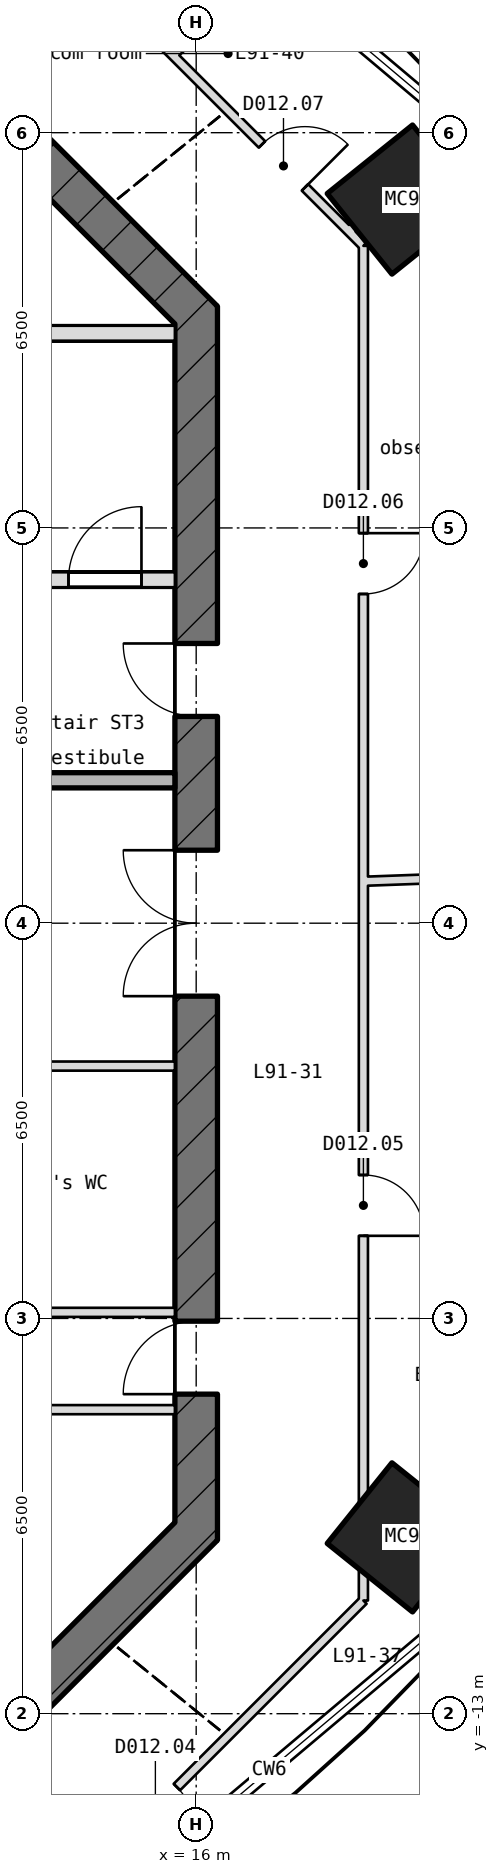
"""IFC4 building model, lengths in metres.
Left out: names, types, materials, properties, quantities, classifications, styles, units other than length and angle.
Written with IfcOpenShell. Run it as: python <this file> out.ifc"""

import sys

from ifc_helpers import new_model, si_unit, direction, frame, frame_2d, origin, origin_2d, place, context, subcontext, project, spatial, rectangle, hollow_rectangle, extrude, element, fill, save


model = new_model("IFC4")
c1 = context("Model", 3, precision=1e-05, world=origin(), true_north=direction((0.0, 1.0)))
c2 = subcontext(c1, "Body", "Model", "MODEL_VIEW")
j1 = project(units=[si_unit("LENGTHUNIT", "METRE"), si_unit("PLANEANGLEUNIT", "RADIAN")], contexts=[c1])
p1 = place(None, origin())
s1 = spatial("IfcSite", under=j1, at=p1, CompositionType="ELEMENT")
p2 = place(p1, origin())
s2 = spatial("IfcBuilding", under=s1, at=p2, CompositionType="ELEMENT")
p3 = place(p2, frame((0.0, 0.0, 401.95)))
s3 = spatial("IfcBuildingStorey", under=s2, at=p3, CompositionType="ELEMENT", Elevation=401.95)
for number, where, z_axis, x_axis in (
    (1, (19.389, 11.9, -0.25), (0.0, 0.0, 1.0), (0.626, -0.78, 0.0)),
    (2, (19.389, -10.1, -0.25), (0.0, 0.0, 1.0), (-0.626, -0.78, 0.0)),
):
    element("IfcColumn", number, at=place(p3, frame(where, z_axis=z_axis, x_axis=x_axis)), inside=s3, PredefinedType="COLUMN", context=c2, shape_type="SweptSolid", body=[
        extrude(hollow_rectangle(XDim=1.7, YDim=1.8, WallThickness=0.05, at=origin_2d()), origin(), (0.0, 0.0, 1.0), 5.55),
    ])
p4 = place(p3, frame((12.897, -13.103, -0.25), z_axis=(0.0, 0.0, 1.0), x_axis=(0.707106781187, 0.707106781187, 0.0)))
e3 = element("IfcWall", 3, at=p4, inside=s3, PredefinedType="SHEAR", context=c2, shape_type="SweptSolid", body=[
    extrude(rectangle(XDim=4.533, YDim=0.7, at=frame_2d((2.266, 0.0))), origin(), (0.0, 0.0, 1.0), 5.55),
])
p5 = place(p3, frame((16.0, -10.145, -0.25), z_axis=(0.0, 0.0, 1.0), x_axis=(0.0, 1.0, 0.0)))
e4 = element("IfcWall", 4, at=p5, inside=s3, PredefinedType="SHEAR", context=c2, shape_type="SweptSolid", body=[
    extrude(rectangle(XDim=20.29, YDim=0.7, at=frame_2d((10.145, 0.0))), origin(), (0.0, 0.0, 1.0), 5.55),
])
p6 = place(p5, frame((8.945, 0.0, 0.25)))
e5 = element("IfcOpeningElement", 5, at=p6, cuts=e4, PredefinedType="OPENING", context=c2, shape_type="SweptSolid", body=[
    extrude(rectangle(XDim=2.4, YDim=2.1, at=frame_2d((1.2, 1.05))), frame((0.0, 0.36, 0.0), z_axis=(0.0, -1.0, 0.0), x_axis=(1.0, 0.0, 0.0)), (0.0, 0.0, 1.0), 0.72),
])
p7 = place(p5, frame((13.545, 0.0, 0.25)))
e6 = element("IfcOpeningElement", 6, at=p7, cuts=e4, PredefinedType="OPENING", context=c2, shape_type="SweptSolid", body=[
    extrude(rectangle(XDim=1.2, YDim=2.1, at=frame_2d((0.6, 1.05))), frame((0.0, 0.36, 0.0), z_axis=(0.0, -1.0, 0.0), x_axis=(1.0, 0.0, 0.0)), (0.0, 0.0, 1.0), 0.72),
])
p8 = place(p5, frame((2.4, 0.0, 0.25)))
e7 = element("IfcOpeningElement", 7, at=p8, cuts=e4, PredefinedType="OPENING", context=c2, shape_type="SweptSolid", body=[
    extrude(rectangle(XDim=1.2, YDim=2.1, at=frame_2d((0.6, 1.05))), frame((0.0, 0.36, 0.0), z_axis=(0.0, -1.0, 0.0), x_axis=(1.0, 0.0, 0.0)), (0.0, 0.0, 1.0), 0.72),
])
p9 = place(p3, frame((16.103, 9.897, -0.25), z_axis=(0.0, 0.0, 1.0), x_axis=(-0.707106781187, 0.707106781187, 0.0)))
e8 = element("IfcWall", 8, at=p9, inside=s3, PredefinedType="SHEAR", context=c2, shape_type="SweptSolid", body=[
    extrude(rectangle(XDim=4.533, YDim=0.7, at=frame_2d((2.266, 0.0))), origin(), (0.0, 0.0, 1.0), 5.55),
])
p10 = place(p3, frame((8.55, -8.0, 0.0), z_axis=(0.0, 0.0, 1.0), x_axis=(1.0, 0.0, 0.0)))
e9 = element("IfcWall", 9, at=p10, inside=s3, PredefinedType="PARTITIONING", context=c2, shape_type="SweptSolid", body=[
    extrude(rectangle(XDim=7.1, YDim=0.15, at=frame_2d((3.55, 0.0))), origin(), (0.0, 0.0, 1.0), 5.3),
])
p11 = place(p10, frame((2.975, 0.0, 0.0)))
e10 = element("IfcOpeningElement", 10, at=p11, cuts=e9, PredefinedType="OPENING", context=c2, shape_type="SweptSolid", body=[
    extrude(rectangle(XDim=1.0, YDim=2.1, at=frame_2d((0.5, 1.05))), frame((0.0, 0.085, 0.0), z_axis=(0.0, -1.0, 0.0), x_axis=(1.0, 0.0, 0.0)), (0.0, 0.0, 1.0), 0.17),
])
p12 = place(p3, frame((8.55, -6.4, 0.0), z_axis=(0.0, 0.0, 1.0), x_axis=(1.0, 0.0, 0.0)))
e11 = element("IfcWall", 11, at=p12, inside=s3, PredefinedType="PARTITIONING", context=c2, shape_type="SweptSolid", body=[
    extrude(rectangle(XDim=7.1, YDim=0.15, at=frame_2d((3.55, 0.0))), origin(), (0.0, 0.0, 1.0), 5.3),
])
p13 = place(p12, frame((2.975, 0.0, 0.0)))
e12 = element("IfcOpeningElement", 12, at=p13, cuts=e11, PredefinedType="OPENING", context=c2, shape_type="SweptSolid", body=[
    extrude(rectangle(XDim=1.0, YDim=2.1, at=frame_2d((0.5, 1.05))), frame((0.0, 0.085, 0.0), z_axis=(0.0, -1.0, 0.0), x_axis=(1.0, 0.0, 0.0)), (0.0, 0.0, 1.0), 0.17),
])
p14 = place(p3, frame((8.4, -2.35, 0.0), z_axis=(0.0, 0.0, 1.0), x_axis=(1.0, 0.0, 0.0)))
e13 = element("IfcWall", 13, at=p14, inside=s3, PredefinedType="PARTITIONING", context=c2, shape_type="SweptSolid", body=[
    extrude(rectangle(XDim=7.25, YDim=0.15, at=frame_2d((3.625, 0.0))), origin(), (0.0, 0.0, 1.0), 5.3),
])
p15 = place(p3, frame((8.4, 2.35, 0.0), z_axis=(0.0, 0.0, 1.0), x_axis=(1.0, 0.0, 0.0)))
e14 = element("IfcWall", 14, at=p15, inside=s3, PredefinedType="STANDARD", context=c2, shape_type="SweptSolid", body=[
    extrude(rectangle(XDim=7.25, YDim=0.25, at=frame_2d((3.625, 0.0))), origin(), (0.0, 0.0, 1.0), 5.3),
])
p16 = place(p3, frame((8.55, 5.65, -0.25), z_axis=(0.0, 0.0, 1.0), x_axis=(1.0, 0.0, 0.0)))
e15 = element("IfcWall", 15, at=p16, inside=s3, PredefinedType="SHEAR", context=c2, shape_type="SweptSolid", body=[
    extrude(rectangle(XDim=7.1, YDim=0.25, at=frame_2d((3.55, 0.0))), origin(), (0.0, 0.0, 1.0), 5.55),
])
p17 = place(p16, frame((5.35, 0.0, 0.25)))
e16 = element("IfcOpeningElement", 16, at=p17, cuts=e15, PredefinedType="OPENING", context=c2, shape_type="SweptSolid", body=[
    extrude(rectangle(XDim=1.2, YDim=2.1, at=frame_2d((0.6, 1.05))), frame((0.0, 0.135, 0.0), z_axis=(0.0, -1.0, 0.0), x_axis=(1.0, 0.0, 0.0)), (0.0, 0.0, 1.0), 0.27),
])
p18 = place(p3, frame((8.55, 9.7, -0.25), z_axis=(0.0, 0.0, 1.0), x_axis=(1.0, 0.0, 0.0)))
e17 = element("IfcWall", 17, at=p18, inside=s3, PredefinedType="SHEAR", context=c2, shape_type="SweptSolid", body=[
    extrude(rectangle(XDim=7.1, YDim=0.25, at=frame_2d((3.55, 0.0))), origin(), (0.0, 0.0, 1.0), 5.55),
])
p19 = place(p3, frame((18.75, 0.689, 0.0), z_axis=(0.0, 0.0, 1.0), x_axis=(0.999324436598, 0.036751468252, 0.0)))
e18 = element("IfcWall", 18, at=p19, inside=s3, PredefinedType="PARTITIONING", context=c2, shape_type="SweptSolid", body=[
    extrude(rectangle(XDim=5.726, YDim=0.15, at=frame_2d((2.863, 0.0))), origin(), (0.0, 0.0, 1.0), 5.3),
])
p20 = place(p3, frame((18.501, 11.388, 0.0), z_axis=(0.0, 0.0, 1.0), x_axis=(0.851577096896, 0.524229384946, 0.0)))
e19 = element("IfcWall", 19, at=p20, inside=s3, PredefinedType="PARTITIONING", context=c2, shape_type="SweptSolid", body=[
    extrude(rectangle(XDim=2.581, YDim=0.15, at=frame_2d((1.29, 0.0))), origin(), (0.0, 0.0, 1.0), 5.3),
])
p21 = place(p3, frame((14.139, -15.75, 0.0), z_axis=(0.0, 0.0, 1.0), x_axis=(0.707106781187, 0.707106781187, 0.0)))
e20 = element("IfcWall", 20, at=p21, inside=s3, PredefinedType="PARTITIONING", context=c2, shape_type="SweptSolid", body=[
    extrude(rectangle(XDim=6.521, YDim=0.15, at=frame_2d((3.26, 0.0))), origin(), (0.0, 0.0, 1.0), 5.3),
])
p22 = place(p21, frame((1.183, 0.0, 0.0)))
e21 = element("IfcOpeningElement", 21, at=p22, cuts=e20, PredefinedType="OPENING", context=c2, shape_type="SweptSolid", body=[
    extrude(rectangle(XDim=1.0, YDim=2.1, at=frame_2d((0.5, 1.05))), frame((0.0, 0.085, 0.0), z_axis=(0.0, -1.0, 0.0), x_axis=(1.0, 0.0, 0.0)), (0.0, 0.0, 1.0), 0.17),
])
p23 = place(p3, frame((18.75, -11.139, 0.0), z_axis=(0.0, 0.0, 1.0), x_axis=(0.0, 1.0, 0.0)))
e22 = element("IfcWall", 22, at=p23, inside=s3, PredefinedType="PARTITIONING", context=c2, shape_type="SweptSolid", body=[
    extrude(rectangle(XDim=22.278, YDim=0.15, at=frame_2d((11.139, 0.0))), origin(), (0.0, 0.0, 1.0), 5.3),
])
p24 = place(p23, frame((5.998, 0.0, 0.0)))
e23 = element("IfcOpeningElement", 23, at=p24, cuts=e22, PredefinedType="OPENING", context=c2, shape_type="SweptSolid", body=[
    extrude(rectangle(XDim=1.0, YDim=2.1, at=frame_2d((0.5, 1.05))), frame((0.0, 0.085, 0.0), z_axis=(0.0, -1.0, 0.0), x_axis=(1.0, 0.0, 0.0)), (0.0, 0.0, 1.0), 0.17),
])
p25 = place(p23, frame((16.553, 0.0, 0.0)))
e24 = element("IfcOpeningElement", 24, at=p25, cuts=e22, PredefinedType="OPENING", context=c2, shape_type="SweptSolid", body=[
    extrude(rectangle(XDim=1.0, YDim=2.1, at=frame_2d((0.5, 1.05))), frame((0.0, 0.085, 0.0), z_axis=(0.0, -1.0, 0.0), x_axis=(1.0, 0.0, 0.0)), (0.0, 0.0, 1.0), 0.17),
])
p26 = place(p3, frame((18.75, 11.139, 0.0), z_axis=(0.0, 0.0, 1.0), x_axis=(-0.707106781187, 0.707106781187, 0.0)))
e25 = element("IfcWall", 25, at=p26, inside=s3, PredefinedType="PARTITIONING", context=c2, shape_type="SweptSolid", body=[
    extrude(rectangle(XDim=4.44, YDim=0.15, at=frame_2d((2.22, 0.0))), origin(), (0.0, 0.0, 1.0), 5.3),
])
p27 = place(p26, frame((1.359, 0.0, 0.0)))
e26 = element("IfcOpeningElement", 26, at=p27, cuts=e25, PredefinedType="OPENING", context=c2, shape_type="SweptSolid", body=[
    extrude(rectangle(XDim=1.0, YDim=2.1, at=frame_2d((0.5, 1.05))), frame((0.0, 0.085, 0.0), z_axis=(0.0, -1.0, 0.0), x_axis=(1.0, 0.0, 0.0)), (0.0, 0.0, 1.0), 0.17),
])
p28 = place(p3, frame((20.661, -10.987, 0.0), z_axis=(0.0, 0.0, 1.0), x_axis=(-0.882908214284, 0.469545615621, 0.0)))
e27 = element("IfcWall", 27, at=p28, inside=s3, PredefinedType="PARTITIONING", context=c2, shape_type="SweptSolid", body=[
    extrude(rectangle(XDim=2.164, YDim=0.15, at=frame_2d((1.082, 0.0))), origin(), (0.0, 0.0, 1.0), 5.3),
])
p29 = place(p3, frame((15.614, 14.276, 0.0), z_axis=(0.0, 0.0, 1.0), x_axis=(0.738014143535, 0.674785242831, 0.0)))
e28 = element("IfcWall", 28, at=p29, inside=s3, PredefinedType="PARTITIONING", context=c2, shape_type="SweptSolid", body=[
    extrude(rectangle(XDim=2.131, YDim=0.15, at=frame_2d((1.066, 0.0))), origin(), (0.0, 0.0, 1.0), 5.3),
])
p30 = place(p3, frame((15.617, 14.272, 0.0), z_axis=(0.0, 0.0, 1.0), x_axis=(-0.707106781187, 0.707106781187, 0.0)))
e29 = element("IfcWall", 29, at=p30, inside=s3, PredefinedType="PARTITIONING", context=c2, shape_type="SweptSolid", body=[
    extrude(rectangle(XDim=2.09, YDim=0.15, at=frame_2d((1.045, 0.0))), origin(), (0.0, 0.0, 1.0), 5.3),
])
p31 = place(p30, frame((0.598, 0.0, 0.0)))
e30 = element("IfcOpeningElement", 30, at=p31, cuts=e29, PredefinedType="OPENING", context=c2, shape_type="SweptSolid", body=[
    extrude(rectangle(XDim=0.9, YDim=2.1, at=frame_2d((0.45, 1.05))), frame((0.0, 0.085, 0.0), z_axis=(0.0, -1.0, 0.0), x_axis=(1.0, 0.0, 0.0)), (0.0, 0.0, 1.0), 0.17),
])
p32 = place(p17, origin())
e31 = element("IfcDoor", 31, at=p32, inside=s3, OperationType="SINGLE_SWING_RIGHT", PredefinedType="DOOR", context=c2, shape_type="SweptSolid", body=[
    extrude(rectangle(XDim=1.2, YDim=2.1, at=frame_2d((0.6, 1.05))), frame((0.0, 0.025, 0.0), z_axis=(0.0, -1.0, 0.0), x_axis=(1.0, 0.0, 0.0)), (0.0, 0.0, 1.0), 0.05),
])
fill(e16, e31)
p33 = place(p6, origin())
e32 = element("IfcDoor", 32, at=p33, inside=s3, OperationType="DOUBLE_DOOR_SINGLE_SWING", PredefinedType="DOOR", context=c2, shape_type="SweptSolid", body=[
    extrude(rectangle(XDim=2.4, YDim=2.1, at=frame_2d((1.2, 1.05))), frame((0.0, 0.025, 0.0), z_axis=(0.0, -1.0, 0.0), x_axis=(1.0, 0.0, 0.0)), (0.0, 0.0, 1.0), 0.05),
])
fill(e5, e32)
p34 = place(p7, origin())
e33 = element("IfcDoor", 33, at=p34, inside=s3, OperationType="SINGLE_SWING_RIGHT", PredefinedType="DOOR", context=c2, shape_type="SweptSolid", body=[
    extrude(rectangle(XDim=1.2, YDim=2.1, at=frame_2d((0.6, 1.05))), frame((0.0, 0.025, 0.0), z_axis=(0.0, -1.0, 0.0), x_axis=(1.0, 0.0, 0.0)), (0.0, 0.0, 1.0), 0.05),
])
fill(e6, e33)
p35 = place(p8, origin())
e34 = element("IfcDoor", 34, at=p35, inside=s3, OperationType="SINGLE_SWING_RIGHT", PredefinedType="DOOR", context=c2, shape_type="SweptSolid", body=[
    extrude(rectangle(XDim=1.2, YDim=2.1, at=frame_2d((0.6, 1.05))), frame((0.0, 0.025, 0.0), z_axis=(0.0, -1.0, 0.0), x_axis=(1.0, 0.0, 0.0)), (0.0, 0.0, 1.0), 0.05),
])
fill(e7, e34)
p36 = place(p22, frame((1.0, 0.0, 0.0), z_axis=(0.0, 0.0, 1.0), x_axis=(-1.0, 0.0, 0.0)))
e35 = element("IfcDoor", 35, at=p36, inside=s3, OperationType="SINGLE_SWING_LEFT", PredefinedType="DOOR", context=c2, shape_type="SweptSolid", body=[
    extrude(rectangle(XDim=1.0, YDim=2.1, at=frame_2d((0.5, 1.05))), frame((0.0, 0.025, 0.0), z_axis=(0.0, -1.0, 0.0), x_axis=(1.0, 0.0, 0.0)), (0.0, 0.0, 1.0), 0.05),
])
fill(e21, e35)
p37 = place(p24, frame((1.0, 0.0, 0.0), z_axis=(0.0, 0.0, 1.0), x_axis=(-1.0, 0.0, 0.0)))
e36 = element("IfcDoor", 36, at=p37, inside=s3, OperationType="SINGLE_SWING_LEFT", PredefinedType="DOOR", context=c2, shape_type="SweptSolid", body=[
    extrude(rectangle(XDim=1.0, YDim=2.1, at=frame_2d((0.5, 1.05))), frame((0.0, 0.025, 0.0), z_axis=(0.0, -1.0, 0.0), x_axis=(1.0, 0.0, 0.0)), (0.0, 0.0, 1.0), 0.05),
])
fill(e23, e36)
p38 = place(p25, frame((1.0, 0.0, 0.0), z_axis=(0.0, 0.0, 1.0), x_axis=(-1.0, 0.0, 0.0)))
e37 = element("IfcDoor", 37, at=p38, inside=s3, OperationType="SINGLE_SWING_LEFT", PredefinedType="DOOR", context=c2, shape_type="SweptSolid", body=[
    extrude(rectangle(XDim=1.0, YDim=2.1, at=frame_2d((0.5, 1.05))), frame((0.0, 0.025, 0.0), z_axis=(0.0, -1.0, 0.0), x_axis=(1.0, 0.0, 0.0)), (0.0, 0.0, 1.0), 0.05),
])
fill(e24, e37)
p39 = place(p27, frame((1.0, 0.0, 0.0), z_axis=(0.0, 0.0, 1.0), x_axis=(-1.0, 0.0, 0.0)))
e38 = element("IfcDoor", 38, at=p39, inside=s3, OperationType="SINGLE_SWING_LEFT", PredefinedType="DOOR", context=c2, shape_type="SweptSolid", body=[
    extrude(rectangle(XDim=1.0, YDim=2.1, at=frame_2d((0.5, 1.05))), frame((0.0, 0.025, 0.0), z_axis=(0.0, -1.0, 0.0), x_axis=(1.0, 0.0, 0.0)), (0.0, 0.0, 1.0), 0.05),
])
fill(e26, e38)
save(model, sys.argv[1])
